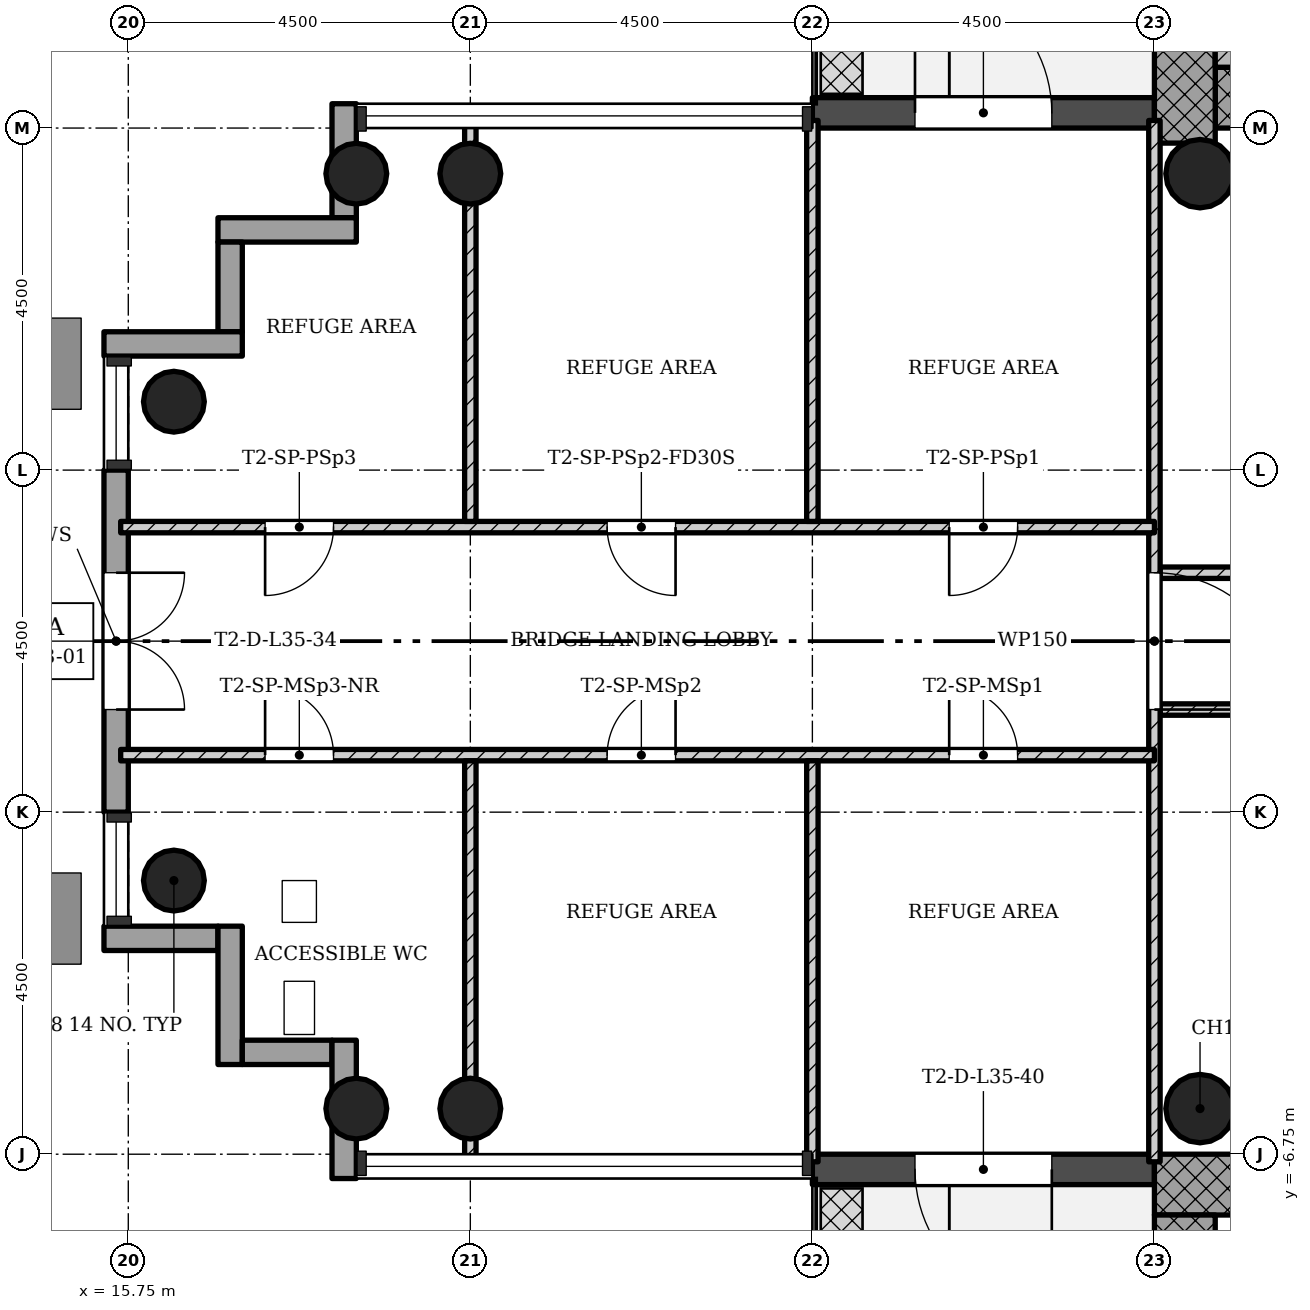
"""IFC4 building model, lengths in metres.
Left out: names, types, materials, properties, quantities, classifications, styles, units other than length and angle.
Written with IfcOpenShell. Run it as: python <this file> out.ifc"""

import sys

from ifc_helpers import new_model, si_unit, direction, frame, frame_2d, origin, origin_2d, place, context, subcontext, project, spatial, rectangle, hollow_circle, extrude, element, fill, save


model = new_model("IFC4")
c1 = context("Model", 3, precision=1e-05, world=origin(), true_north=direction((0.0, 1.0)))
c2 = subcontext(c1, "Body", "Model", "MODEL_VIEW")
j1 = project(units=[si_unit("LENGTHUNIT", "METRE"), si_unit("PLANEANGLEUNIT", "RADIAN")], contexts=[c1])
p1 = place(None, origin())
s1 = spatial("IfcSite", under=j1, at=p1, CompositionType="ELEMENT")
p2 = place(p1, origin())
s2 = spatial("IfcBuilding", under=s1, at=p2, CompositionType="ELEMENT")
p3 = place(p2, frame((0.0, 0.0, 128.7)))
s3 = spatial("IfcBuildingStorey", under=s2, at=p3, CompositionType="ELEMENT", Elevation=128.7)
p4 = place(p3, frame((30.05, 7.15, 0.0), z_axis=(0.0, 0.0, 1.0), x_axis=(1.0, 0.0, 0.0)))
e1 = element("IfcWall", 1, at=p4, inside=s3, PredefinedType="SHEAR", context=c2, shape_type="SweptSolid", body=[
    extrude(rectangle(XDim=12.7, YDim=0.8, at=frame_2d((6.35, 0.0))), origin(), (0.0, 0.0, 1.0), 5.0),
])
p5 = place(p4, frame((5.05, 0.0, 0.0)))
e2 = element("IfcOpeningElement", 2, at=p5, cuts=e1, PredefinedType="OPENING", context=c2, shape_type="SweptSolid", body=[
    extrude(rectangle(XDim=1.8, YDim=2.1, at=frame_2d((0.9, 1.05))), frame((0.0, 0.41, 0.0), z_axis=(0.0, -1.0, 0.0), x_axis=(1.0, 0.0, 0.0)), (0.0, 0.0, 1.0), 0.82),
])
p6 = place(p3, frame((29.65, 15.348, 0.0), z_axis=(0.0, 0.0, 1.0), x_axis=(0.0, -1.0, 0.0)))
e3 = element("IfcWall", 3, at=p6, inside=s3, PredefinedType="SHEAR", context=c2, shape_type="SweptSolid", body=[
    extrude(rectangle(XDim=8.796, YDim=0.8, at=frame_2d((4.398, 0.0))), origin(), (0.0, 0.0, 1.0), 5.0),
])
p7 = place(p3, frame((41.95, -7.15, 0.0), z_axis=(0.0, 0.0, 1.0), x_axis=(-1.0, 0.0, 0.0)))
e4 = element("IfcWall", 4, at=p7, inside=s3, PredefinedType="SHEAR", context=c2, shape_type="SweptSolid", body=[
    extrude(rectangle(XDim=12.7, YDim=0.8, at=frame_2d((6.35, 0.0))), origin(), (0.0, 0.0, 1.0), 5.0),
])
p8 = place(p7, frame((5.05, 0.0, 0.0)))
e5 = element("IfcOpeningElement", 5, at=p8, cuts=e4, PredefinedType="OPENING", context=c2, shape_type="SweptSolid", body=[
    extrude(rectangle(XDim=1.8, YDim=2.1, at=frame_2d((0.9, 1.05))), frame((0.0, 0.41, 0.0), z_axis=(0.0, -1.0, 0.0), x_axis=(1.0, 0.0, 0.0)), (0.0, 0.0, 1.0), 0.82),
])
p9 = place(p3, frame((29.65, -7.55, 0.0), z_axis=(0.0, 0.0, 1.0), x_axis=(0.0, -1.0, 0.0)))
e6 = element("IfcWall", 6, at=p9, inside=s3, PredefinedType="SHEAR", context=c2, shape_type="SweptSolid", body=[
    extrude(rectangle(XDim=8.2, YDim=0.8, at=frame_2d((4.1, 0.0))), origin(), (0.0, 0.0, 1.0), 5.0),
])
for number, where, z_axis, x_axis in (
    (7, (20.25, 6.15, 0.0), (0.0, 0.0, 1.0), (1.0, 0.0, 0.0)),
    (8, (20.25, -6.15, 0.0), (0.0, 0.0, 1.0), (1.0, 0.0, 0.0)),
    (9, (18.75, 6.15, 0.0), (0.0, 0.0, 1.0), (1.0, 0.0, 0.0)),
    (10, (18.75, -6.15, 0.0), (0.0, 0.0, 1.0), (1.0, 0.0, 0.0)),
    (11, (16.35, 3.15, 0.0), (0.0, 0.0, 1.0), (1.0, 0.0, 0.0)),
    (12, (16.35, -3.15, 0.0), (0.0, 0.0, 1.0), (1.0, 0.0, 0.0)),
):
    element("IfcColumn", number, at=place(p3, frame(where, z_axis=z_axis, x_axis=x_axis)), inside=s3, PredefinedType="COLUMN", context=c2, shape_type="SweptSolid", body=[
        extrude(hollow_circle(Radius=0.4, WallThickness=0.028, at=origin_2d()), origin(), (0.0, 0.0, 1.0), 5.0),
    ])
for number, where, z_axis, x_axis in (
    (13, (29.85, 6.15, 0.0), (0.0, 0.0, 1.0), (1.0, 0.0, 0.0)),
    (14, (29.85, -6.15, 0.0), (0.0, 0.0, 1.0), (1.0, 0.0, 0.0)),
):
    element("IfcColumn", number, at=place(p3, frame(where, z_axis=z_axis, x_axis=x_axis)), inside=s3, PredefinedType="COLUMN", context=c2, shape_type="SweptSolid", body=[
        extrude(hollow_circle(Radius=0.45, WallThickness=0.032, at=origin_2d()), origin(), (0.0, 0.0, 1.0), 5.0),
    ])
p10 = place(p3, frame((29.25, 6.95, -0.02), z_axis=(0.0, 0.0, 1.0), x_axis=(-1.0, 0.0, 0.0)))
e15 = element("IfcWall", 15, at=p10, inside=s3, PredefinedType="STANDARD", context=c2, shape_type="SweptSolid", body=[
    extrude(rectangle(XDim=4.5, YDim=0.4, at=frame_2d((2.25, 0.0))), origin(), (0.0, 0.0, 1.0), 4.72),
])
p11 = place(p10, frame((1.35, 0.0, 0.02)))
e16 = element("IfcOpeningElement", 16, at=p11, cuts=e15, PredefinedType="OPENING", context=c2, shape_type="SweptSolid", body=[
    extrude(rectangle(XDim=1.8, YDim=2.1, at=frame_2d((0.9, 1.05))), frame((0.0, 0.21, 0.0), z_axis=(0.0, -1.0, 0.0), x_axis=(1.0, 0.0, 0.0)), (0.0, 0.0, 1.0), 0.42),
])
p12 = place(p3, frame((18.59, 7.07, -0.3), z_axis=(0.0, 0.0, 1.0), x_axis=(0.0, -1.0, 0.0)))
e17 = element("IfcWall", 17, at=p12, inside=s3, PredefinedType="STANDARD", context=c2, shape_type="SweptSolid", body=[
    extrude(rectangle(XDim=1.5, YDim=0.32, at=frame_2d((0.75, 0.0))), origin(), (0.0, 0.0, 1.0), 5.0),
])
p13 = place(p3, frame((18.75, 5.41, -0.3), z_axis=(0.0, 0.0, 1.0), x_axis=(-1.0, 0.0, 0.0)))
e18 = element("IfcWall", 18, at=p13, inside=s3, PredefinedType="STANDARD", context=c2, shape_type="SweptSolid", body=[
    extrude(rectangle(XDim=1.82, YDim=0.32, at=frame_2d((0.91, 0.0))), origin(), (0.0, 0.0, 1.0), 5.0),
])
p14 = place(p3, frame((17.09, 5.25, -0.3), z_axis=(0.0, 0.0, 1.0), x_axis=(0.0, -1.0, 0.0)))
e19 = element("IfcWall", 19, at=p14, inside=s3, PredefinedType="STANDARD", context=c2, shape_type="SweptSolid", body=[
    extrude(rectangle(XDim=1.18, YDim=0.32, at=frame_2d((0.59, 0.0))), origin(), (0.0, 0.0, 1.0), 5.0),
])
p15 = place(p3, frame((17.25, 3.91, -0.3), z_axis=(0.0, 0.0, 1.0), x_axis=(-1.0, 0.0, 0.0)))
e20 = element("IfcWall", 20, at=p15, inside=s3, PredefinedType="STANDARD", context=c2, shape_type="SweptSolid", body=[
    extrude(rectangle(XDim=1.82, YDim=0.32, at=frame_2d((0.91, 0.0))), origin(), (0.0, 0.0, 1.0), 5.0),
])
p16 = place(p3, frame((15.59, 2.25, -0.12), z_axis=(0.0, 0.0, 1.0), x_axis=(0.0, -1.0, 0.0)))
e21 = element("IfcWall", 21, at=p16, inside=s3, PredefinedType="STANDARD", context=c2, shape_type="SweptSolid", body=[
    extrude(rectangle(XDim=4.5, YDim=0.32, at=frame_2d((2.25, 0.0))), origin(), (0.0, 0.0, 1.0), 4.82),
])
p17 = place(p16, frame((1.35, 0.0, 0.0)))
e22 = element("IfcOpeningElement", 22, at=p17, cuts=e21, PredefinedType="OPENING", context=c2, shape_type="SweptSolid", body=[
    extrude(rectangle(XDim=1.8, YDim=2.1, at=frame_2d((0.9, 1.05))), frame((0.0, 0.17, 0.0), z_axis=(0.0, -1.0, 0.0), x_axis=(1.0, 0.0, 0.0)), (0.0, 0.0, 1.0), 0.34),
])
p18 = place(p3, frame((15.43, -3.91, -0.3), z_axis=(0.0, 0.0, 1.0), x_axis=(1.0, 0.0, 0.0)))
e23 = element("IfcWall", 23, at=p18, inside=s3, PredefinedType="STANDARD", context=c2, shape_type="SweptSolid", body=[
    extrude(rectangle(XDim=1.5, YDim=0.32, at=frame_2d((0.75, 0.0))), origin(), (0.0, 0.0, 1.0), 5.0),
])
p19 = place(p3, frame((17.09, -3.75, -0.3), z_axis=(0.0, 0.0, 1.0), x_axis=(0.0, -1.0, 0.0)))
e24 = element("IfcWall", 24, at=p19, inside=s3, PredefinedType="STANDARD", context=c2, shape_type="SweptSolid", body=[
    extrude(rectangle(XDim=1.82, YDim=0.32, at=frame_2d((0.91, 0.0))), origin(), (0.0, 0.0, 1.0), 5.0),
])
p20 = place(p3, frame((17.25, -5.41, -0.3), z_axis=(0.0, 0.0, 1.0), x_axis=(1.0, 0.0, 0.0)))
e25 = element("IfcWall", 25, at=p20, inside=s3, PredefinedType="STANDARD", context=c2, shape_type="SweptSolid", body=[
    extrude(rectangle(XDim=1.18, YDim=0.32, at=frame_2d((0.59, 0.0))), origin(), (0.0, 0.0, 1.0), 5.0),
])
p21 = place(p3, frame((18.59, -5.25, -0.3), z_axis=(0.0, 0.0, 1.0), x_axis=(0.0, -1.0, 0.0)))
e26 = element("IfcWall", 26, at=p21, inside=s3, PredefinedType="STANDARD", context=c2, shape_type="SweptSolid", body=[
    extrude(rectangle(XDim=1.82, YDim=0.32, at=frame_2d((0.91, 0.0))), origin(), (0.0, 0.0, 1.0), 5.0),
])
p22 = place(p3, frame((24.75, -6.95, -0.02), z_axis=(0.0, 0.0, 1.0), x_axis=(1.0, 0.0, 0.0)))
e27 = element("IfcWall", 27, at=p22, inside=s3, PredefinedType="STANDARD", context=c2, shape_type="SweptSolid", body=[
    extrude(rectangle(XDim=4.5, YDim=0.4, at=frame_2d((2.25, 0.0))), origin(), (0.0, 0.0, 1.0), 4.72),
])
p23 = place(p22, frame((1.35, 0.0, 0.02)))
e28 = element("IfcOpeningElement", 28, at=p23, cuts=e27, PredefinedType="OPENING", context=c2, shape_type="SweptSolid", body=[
    extrude(rectangle(XDim=1.8, YDim=2.1, at=frame_2d((0.9, 1.05))), frame((0.0, 0.21, 0.0), z_axis=(0.0, -1.0, 0.0), x_axis=(1.0, 0.0, 0.0)), (0.0, 0.0, 1.0), 0.42),
])
for number, where, z_axis, x_axis in (
    (29, (35.025, 0.9, 0.0), (0.0, 0.0, 1.0), (-1.0, 0.0, 0.0)),
    (30, (35.025, -0.9, 0.0), (0.0, 0.0, 1.0), (-1.0, 0.0, 0.0)),
):
    element("IfcWall", number, at=place(p3, frame(where, z_axis=z_axis, x_axis=x_axis)), inside=s3, PredefinedType="PARTITIONING", context=c2, shape_type="SweptSolid", body=[
        extrude(rectangle(XDim=5.7, YDim=0.15, at=frame_2d((2.85, 0.0))), origin(), (0.0, 0.0, 1.0), 4.58),
    ])
p24 = place(p3, frame((29.25, -6.85, 0.0), z_axis=(0.0, 0.0, 1.0), x_axis=(0.0, 1.0, 0.0)))
e31 = element("IfcWall", 31, at=p24, inside=s3, PredefinedType="PARTITIONING", context=c2, shape_type="SweptSolid", body=[
    extrude(rectangle(XDim=13.7, YDim=0.15, at=frame_2d((6.85, 0.0))), origin(), (0.0, 0.0, 1.0), 4.58),
])
p25 = place(p24, frame((5.95, 0.0, 0.0)))
e32 = element("IfcOpeningElement", 32, at=p25, cuts=e31, PredefinedType="OPENING", context=c2, shape_type="SweptSolid", body=[
    extrude(rectangle(XDim=1.8, YDim=2.1, at=frame_2d((0.9, 1.05))), frame((0.0, 0.085, 0.0), z_axis=(0.0, -1.0, 0.0), x_axis=(1.0, 0.0, 0.0)), (0.0, 0.0, 1.0), 0.17),
])
p26 = place(p3, frame((29.25, 1.5, 0.0), z_axis=(0.0, 0.0, 1.0), x_axis=(-1.0, 0.0, 0.0)))
e33 = element("IfcWall", 33, at=p26, inside=s3, PredefinedType="PARTITIONING", context=c2, shape_type="SweptSolid", body=[
    extrude(rectangle(XDim=13.6, YDim=0.15, at=frame_2d((6.8, 0.0))), origin(), (0.0, 0.0, 1.0), 4.58),
])
p27 = place(p26, frame((1.8, 0.0, 0.0)))
e34 = element("IfcOpeningElement", 34, at=p27, cuts=e33, PredefinedType="OPENING", context=c2, shape_type="SweptSolid", body=[
    extrude(rectangle(XDim=0.9, YDim=2.1, at=frame_2d((0.45, 1.05))), frame((0.0, 0.085, 0.0), z_axis=(0.0, -1.0, 0.0), x_axis=(1.0, 0.0, 0.0)), (0.0, 0.0, 1.0), 0.17),
])
p28 = place(p26, frame((6.3, 0.0, 0.0)))
e35 = element("IfcOpeningElement", 35, at=p28, cuts=e33, PredefinedType="OPENING", context=c2, shape_type="SweptSolid", body=[
    extrude(rectangle(XDim=0.9, YDim=2.1, at=frame_2d((0.45, 1.05))), frame((0.0, 0.085, 0.0), z_axis=(0.0, -1.0, 0.0), x_axis=(1.0, 0.0, 0.0)), (0.0, 0.0, 1.0), 0.17),
])
p29 = place(p26, frame((10.8, 0.0, 0.0)))
e36 = element("IfcOpeningElement", 36, at=p29, cuts=e33, PredefinedType="OPENING", context=c2, shape_type="SweptSolid", body=[
    extrude(rectangle(XDim=0.9, YDim=2.1, at=frame_2d((0.45, 1.05))), frame((0.0, 0.085, 0.0), z_axis=(0.0, -1.0, 0.0), x_axis=(1.0, 0.0, 0.0)), (0.0, 0.0, 1.0), 0.17),
])
for number, where, z_axis, x_axis in (
    (37, (24.75, 1.575, 0.0), (0.0, 0.0, 1.0), (0.0, 1.0, 0.0)),
    (38, (20.25, 1.575, 0.0), (0.0, 0.0, 1.0), (0.0, 1.0, 0.0)),
):
    element("IfcWall", number, at=place(p3, frame(where, z_axis=z_axis, x_axis=x_axis)), inside=s3, PredefinedType="PARTITIONING", context=c2, shape_type="SweptSolid", body=[
        extrude(rectangle(XDim=5.275, YDim=0.15, at=frame_2d((2.638, 0.0))), origin(), (0.0, 0.0, 1.0), 4.58),
    ])
p30 = place(p3, frame((29.25, -1.5, 0.0), z_axis=(0.0, 0.0, 1.0), x_axis=(-1.0, 0.0, 0.0)))
e39 = element("IfcWall", 39, at=p30, inside=s3, PredefinedType="PARTITIONING", context=c2, shape_type="SweptSolid", body=[
    extrude(rectangle(XDim=13.6, YDim=0.15, at=frame_2d((6.8, 0.0))), origin(), (0.0, 0.0, 1.0), 4.58),
])
p31 = place(p30, frame((1.8, 0.0, 0.0)))
e40 = element("IfcOpeningElement", 40, at=p31, cuts=e39, PredefinedType="OPENING", context=c2, shape_type="SweptSolid", body=[
    extrude(rectangle(XDim=0.9, YDim=2.1, at=frame_2d((0.45, 1.05))), frame((0.0, 0.085, 0.0), z_axis=(0.0, -1.0, 0.0), x_axis=(1.0, 0.0, 0.0)), (0.0, 0.0, 1.0), 0.17),
])
p32 = place(p30, frame((6.3, 0.0, 0.0)))
e41 = element("IfcOpeningElement", 41, at=p32, cuts=e39, PredefinedType="OPENING", context=c2, shape_type="SweptSolid", body=[
    extrude(rectangle(XDim=0.9, YDim=2.1, at=frame_2d((0.45, 1.05))), frame((0.0, 0.085, 0.0), z_axis=(0.0, -1.0, 0.0), x_axis=(1.0, 0.0, 0.0)), (0.0, 0.0, 1.0), 0.17),
])
p33 = place(p30, frame((10.8, 0.0, 0.0)))
e42 = element("IfcOpeningElement", 42, at=p33, cuts=e39, PredefinedType="OPENING", context=c2, shape_type="SweptSolid", body=[
    extrude(rectangle(XDim=0.9, YDim=2.1, at=frame_2d((0.45, 1.05))), frame((0.0, 0.085, 0.0), z_axis=(0.0, -1.0, 0.0), x_axis=(1.0, 0.0, 0.0)), (0.0, 0.0, 1.0), 0.17),
])
for number, where, z_axis, x_axis in (
    (43, (24.75, -1.575, 0.0), (0.0, 0.0, 1.0), (0.0, -1.0, 0.0)),
    (44, (20.25, -1.575, 0.0), (0.0, 0.0, 1.0), (0.0, -1.0, 0.0)),
):
    element("IfcWall", number, at=place(p3, frame(where, z_axis=z_axis, x_axis=x_axis)), inside=s3, PredefinedType="PARTITIONING", context=c2, shape_type="SweptSolid", body=[
        extrude(rectangle(XDim=5.275, YDim=0.15, at=frame_2d((2.638, 0.0))), origin(), (0.0, 0.0, 1.0), 4.58),
    ])
p34 = place(p3, frame((34.15, 7.75, 0.0), z_axis=(0.0, 0.0, 1.0), x_axis=(-1.0, 0.0, 0.0)))
e45 = element("IfcWall", 45, at=p34, inside=s3, PredefinedType="SHEAR", context=c2, shape_type="SweptSolid", body=[
    extrude(rectangle(XDim=4.1, YDim=0.4, at=frame_2d((2.05, 0.0))), origin(), (0.0, 0.0, 1.0), 5.0),
])
p35 = place(p11, origin())
e46 = element("IfcDoor", 46, at=p35, inside=s3, OperationType="SINGLE_SWING_RIGHT", PredefinedType="DOOR", context=c2, shape_type="SweptSolid", body=[
    extrude(rectangle(XDim=1.8, YDim=2.1, at=frame_2d((0.9, 1.05))), frame((0.0, 0.025, 0.0), z_axis=(0.0, -1.0, 0.0), x_axis=(1.0, 0.0, 0.0)), (0.0, 0.0, 1.0), 0.05),
])
fill(e16, e46)
p36 = place(p17, origin())
e47 = element("IfcDoor", 47, at=p36, inside=s3, OperationType="DOUBLE_DOOR_SINGLE_SWING", PredefinedType="DOOR", context=c2, shape_type="SweptSolid", body=[
    extrude(rectangle(XDim=1.8, YDim=2.1, at=frame_2d((0.9, 1.05))), frame((0.0, 0.025, 0.0), z_axis=(0.0, -1.0, 0.0), x_axis=(1.0, 0.0, 0.0)), (0.0, 0.0, 1.0), 0.05),
])
fill(e22, e47)
p37 = place(p23, origin())
e48 = element("IfcDoor", 48, at=p37, inside=s3, OperationType="SINGLE_SWING_RIGHT", PredefinedType="DOOR", context=c2, shape_type="SweptSolid", body=[
    extrude(rectangle(XDim=1.8, YDim=2.1, at=frame_2d((0.9, 1.05))), frame((0.0, 0.025, 0.0), z_axis=(0.0, -1.0, 0.0), x_axis=(1.0, 0.0, 0.0)), (0.0, 0.0, 1.0), 0.05),
])
fill(e28, e48)
p38 = place(p25, origin())
e49 = element("IfcDoor", 49, at=p38, inside=s3, OperationType="SINGLE_SWING_LEFT", PredefinedType="DOOR", context=c2, shape_type="SweptSolid", body=[
    extrude(rectangle(XDim=1.8, YDim=2.1, at=frame_2d((0.9, 1.05))), frame((0.0, 0.025, 0.0), z_axis=(0.0, -1.0, 0.0), x_axis=(1.0, 0.0, 0.0)), (0.0, 0.0, 1.0), 0.05),
])
fill(e32, e49)
p39 = place(p27, origin())
e50 = element("IfcDoor", 50, at=p39, inside=s3, OperationType="SINGLE_SWING_LEFT", PredefinedType="DOOR", context=c2, shape_type="SweptSolid", body=[
    extrude(rectangle(XDim=0.9, YDim=2.1, at=frame_2d((0.45, 1.05))), frame((0.0, 0.025, 0.0), z_axis=(0.0, -1.0, 0.0), x_axis=(1.0, 0.0, 0.0)), (0.0, 0.0, 1.0), 0.05),
])
fill(e34, e50)
p40 = place(p28, origin())
e51 = element("IfcDoor", 51, at=p40, inside=s3, OperationType="SINGLE_SWING_RIGHT", PredefinedType="DOOR", context=c2, shape_type="SweptSolid", body=[
    extrude(rectangle(XDim=0.9, YDim=2.1, at=frame_2d((0.45, 1.05))), frame((0.0, 0.025, 0.0), z_axis=(0.0, -1.0, 0.0), x_axis=(1.0, 0.0, 0.0)), (0.0, 0.0, 1.0), 0.05),
])
fill(e35, e51)
p41 = place(p29, origin())
e52 = element("IfcDoor", 52, at=p41, inside=s3, OperationType="SINGLE_SWING_LEFT", PredefinedType="DOOR", context=c2, shape_type="SweptSolid", body=[
    extrude(rectangle(XDim=0.9, YDim=2.1, at=frame_2d((0.45, 1.05))), frame((0.0, 0.025, 0.0), z_axis=(0.0, -1.0, 0.0), x_axis=(1.0, 0.0, 0.0)), (0.0, 0.0, 1.0), 0.05),
])
fill(e36, e52)
p42 = place(p31, origin())
e53 = element("IfcDoor", 53, at=p42, inside=s3, OperationType="SINGLE_SWING_RIGHT", PredefinedType="DOOR", context=c2, shape_type="SweptSolid", body=[
    extrude(rectangle(XDim=0.9, YDim=2.1, at=frame_2d((0.45, 1.05))), frame((0.0, 0.025, 0.0), z_axis=(0.0, -1.0, 0.0), x_axis=(1.0, 0.0, 0.0)), (0.0, 0.0, 1.0), 0.05),
])
fill(e40, e53)
p43 = place(p32, origin())
e54 = element("IfcDoor", 54, at=p43, inside=s3, OperationType="SINGLE_SWING_LEFT", PredefinedType="DOOR", context=c2, shape_type="SweptSolid", body=[
    extrude(rectangle(XDim=0.9, YDim=2.1, at=frame_2d((0.45, 1.05))), frame((0.0, 0.025, 0.0), z_axis=(0.0, -1.0, 0.0), x_axis=(1.0, 0.0, 0.0)), (0.0, 0.0, 1.0), 0.05),
])
fill(e41, e54)
p44 = place(p33, origin())
e55 = element("IfcDoor", 55, at=p44, inside=s3, OperationType="SINGLE_SWING_RIGHT", PredefinedType="DOOR", context=c2, shape_type="SweptSolid", body=[
    extrude(rectangle(XDim=0.9, YDim=2.1, at=frame_2d((0.45, 1.05))), frame((0.0, 0.025, 0.0), z_axis=(0.0, -1.0, 0.0), x_axis=(1.0, 0.0, 0.0)), (0.0, 0.0, 1.0), 0.05),
])
fill(e42, e55)
save(model, sys.argv[1])
